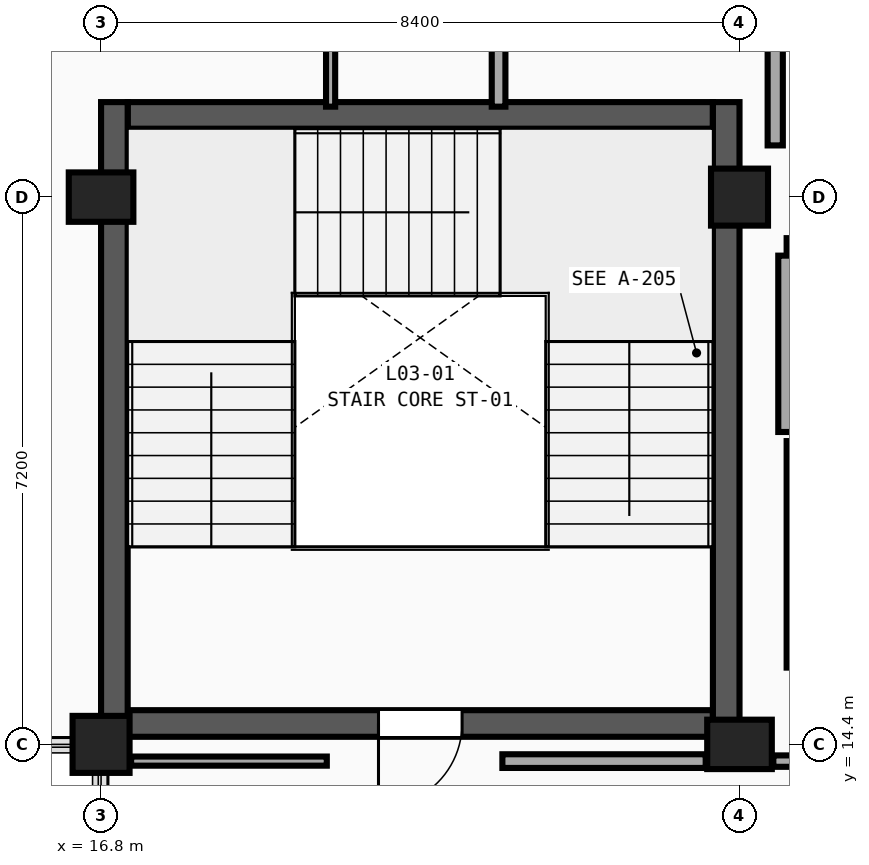
"""IFC4 building model, lengths in metres.
Left out: names, types, materials, properties, quantities, classifications, styles, units other than length and angle.
Written with IfcOpenShell. Run it as: python <this file> out.ifc"""

import sys

from ifc_helpers import new_model, si_unit, direction, frame, frame_2d, origin, origin_2d, place, context, subcontext, project, spatial, rectangle, extrude, element, fill, save


model = new_model("IFC4")
c1 = context("Model", 3, precision=1e-05, world=origin(), true_north=direction((0.0, 1.0)))
c2 = subcontext(c1, "Body", "Model", "MODEL_VIEW")
j1 = project(units=[si_unit("LENGTHUNIT", "METRE"), si_unit("PLANEANGLEUNIT", "RADIAN")], contexts=[c1])
p1 = place(None, origin())
s1 = spatial("IfcSite", under=j1, at=p1, CompositionType="ELEMENT")
p2 = place(p1, origin())
s2 = spatial("IfcBuilding", under=s1, at=p2, CompositionType="ELEMENT")
p3 = place(p2, frame((0.0, 0.0, 14.4)))
s3 = spatial("IfcBuildingStorey", under=s2, at=p3, CompositionType="ELEMENT", Elevation=14.4)
p4 = place(p3, frame((16.8, 14.4, 0.0), z_axis=(0.0, 0.0, 1.0), x_axis=(1.0, 0.0, 0.0)))
e1 = element("IfcColumn", 1, at=p4, inside=s3, PredefinedType="COLUMN", context=c2, shape_type="SweptSolid", body=[
    extrude(rectangle(XDim=0.75, YDim=0.75, at=origin_2d()), origin(), (0.0, 0.0, 1.0), 4.5),
])
for number, where, z_axis, x_axis in (
    (2, (16.8, 21.6, 0.0), (0.0, 0.0, 1.0), (1.0, 0.0, 0.0)),
    (3, (25.2, 14.4, 0.0), (0.0, 0.0, 1.0), (1.0, 0.0, 0.0)),
):
    element("IfcColumn", number, at=place(p3, frame(where, z_axis=z_axis, x_axis=x_axis)), inside=s3, PredefinedType="COLUMN", context=c2, shape_type="SweptSolid", body=[
        extrude(rectangle(XDim=0.85, YDim=0.65, at=origin_2d()), origin(), (0.0, 0.0, 1.0), 4.5),
    ])
p5 = place(p3, frame((25.2, 21.6, 0.0), z_axis=(0.0, 0.0, 1.0), x_axis=(1.0, 0.0, 0.0)))
e4 = element("IfcColumn", 4, at=p5, inside=s3, PredefinedType="COLUMN", context=c2, shape_type="SweptSolid", body=[
    extrude(rectangle(XDim=0.75, YDim=0.75, at=origin_2d()), origin(), (0.0, 0.0, 1.0), 4.5),
])
p6 = place(p3, frame((24.85, 14.675, 0.0), z_axis=(0.0, 0.0, 1.0), x_axis=(-1.0, 0.0, 0.0)))
e5 = element("IfcWall", 5, at=p6, inside=s3, PredefinedType="SHEAR", context=c2, shape_type="SweptSolid", body=[
    extrude(rectangle(XDim=7.7, YDim=0.35, at=frame_2d((3.85, 0.0))), origin(), (0.0, 0.0, 1.0), 4.5),
])
p7 = place(p6, frame((3.3, 0.0, 0.0)))
e6 = element("IfcOpeningElement", 6, at=p7, cuts=e5, PredefinedType="OPENING", context=c2, shape_type="SweptSolid", body=[
    extrude(rectangle(XDim=1.1, YDim=2.2, at=frame_2d((0.55, 1.1))), frame((0.0, 0.195, 0.0), z_axis=(0.0, -1.0, 0.0), x_axis=(1.0, 0.0, 0.0)), (0.0, 0.0, 1.0), 0.39),
])
p8 = place(p3, frame((17.15, 22.675, 0.0), z_axis=(0.0, 0.0, 1.0), x_axis=(1.0, 0.0, 0.0)))
e7 = element("IfcWall", 7, at=p8, inside=s3, PredefinedType="SHEAR", context=c2, shape_type="SweptSolid", body=[
    extrude(rectangle(XDim=7.7, YDim=0.35, at=frame_2d((3.85, 0.0))), origin(), (0.0, 0.0, 1.0), 4.5),
])
for number, where, z_axis, x_axis in (
    (8, (16.975, 22.85, 0.0), (0.0, 0.0, 1.0), (0.0, -1.0, 0.0)),
    (9, (25.025, 14.5, 0.0), (0.0, 0.0, 1.0), (0.0, 1.0, 0.0)),
):
    element("IfcWall", number, at=place(p3, frame(where, z_axis=z_axis, x_axis=x_axis)), inside=s3, PredefinedType="SHEAR", context=c2, shape_type="SweptSolid", body=[
        extrude(rectangle(XDim=8.35, YDim=0.35, at=frame_2d((4.175, 0.0))), origin(), (0.0, 0.0, 1.0), 4.5),
    ])
p9 = place(p3, frame((25.94, 18.39, 0.0), z_axis=(0.0, 0.0, 1.0), x_axis=(0.0, -1.0, 0.0)))
e10 = element("IfcWall", 10, at=p9, inside=s3, PredefinedType="SHEAR", context=c2, shape_type="SweptSolid", body=[
    extrude(rectangle(XDim=2.98, YDim=0.24, at=frame_2d((1.49, 0.0))), origin(), (0.0, 0.0, 1.0), 4.18),
])
p10 = place(p3, frame((25.82, 20.95, 0.0), z_axis=(0.0, 0.0, 1.0), x_axis=(1.0, 0.0, 0.0)))
e11 = element("IfcWall", 11, at=p10, inside=s3, PredefinedType="SOLIDWALL", context=c2, shape_type="SweptSolid", body=[
    extrude(rectangle(XDim=2.54, YDim=0.22, at=frame_2d((1.27, 0.0))), origin(), (0.0, 0.0, 1.0), 3.73),
])
p11 = place(p10, frame((0.745, 0.0, 0.0)))
e12 = element("IfcOpeningElement", 12, at=p11, cuts=e11, PredefinedType="OPENING", context=c2, shape_type="SweptSolid", body=[
    extrude(rectangle(XDim=1.05, YDim=2.15, at=frame_2d((0.525, 1.075))), frame((0.0, 0.13, 0.0), z_axis=(0.0, -1.0, 0.0), x_axis=(1.0, 0.0, 0.0)), (0.0, 0.0, 1.0), 0.26),
])
p12 = place(p3, frame((25.82, 18.51, 0.0), z_axis=(0.0, 0.0, 1.0), x_axis=(0.0, 1.0, 0.0)))
e13 = element("IfcWall", 13, at=p12, inside=s3, PredefinedType="SOLIDWALL", context=c2, shape_type="SweptSolid", body=[
    extrude(rectangle(XDim=2.32, YDim=0.22, at=frame_2d((1.16, 0.0))), origin(), (0.0, 0.0, 1.0), 4.18),
])
p13 = place(p3, frame((22.08, 14.18, 0.0), z_axis=(0.0, 0.0, 1.0), x_axis=(1.0, 0.0, 0.0)))
e14 = element("IfcWall", 14, at=p13, inside=s3, PredefinedType="PARTITIONING", context=c2, shape_type="SweptSolid", body=[
    extrude(rectangle(XDim=2.675, YDim=0.18, at=frame_2d((1.337, 0.0))), origin(), (0.0, 0.0, 1.0), 3.73),
])
p14 = place(p3, frame((25.645, 14.18, 0.0), z_axis=(0.0, 0.0, 1.0), x_axis=(1.0, 0.0, 0.0)))
e15 = element("IfcWall", 15, at=p14, inside=s3, PredefinedType="PARTITIONING", context=c2, shape_type="SweptSolid", body=[
    extrude(rectangle(XDim=7.56, YDim=0.15, at=frame_2d((3.78, 0.0))), origin(), (0.0, 0.0, 1.0), 3.73),
])
p15 = place(p3, frame((17.195, 14.18, 0.0), z_axis=(0.0, 0.0, 1.0), x_axis=(1.0, 0.0, 0.0)))
e16 = element("IfcWall", 16, at=p15, inside=s3, PredefinedType="PARTITIONING", context=c2, shape_type="SweptSolid", body=[
    extrude(rectangle(XDim=2.575, YDim=0.12, at=frame_2d((1.288, 0.0))), origin(), (0.0, 0.0, 1.0), 3.73),
])
p16 = place(p3, frame((22.03, 22.79, 0.0), z_axis=(0.0, 0.0, 1.0), x_axis=(0.0, 1.0, 0.0)))
e17 = element("IfcWall", 17, at=p16, inside=s3, PredefinedType="PARTITIONING", context=c2, shape_type="SweptSolid", body=[
    extrude(rectangle(XDim=2.23, YDim=0.18, at=frame_2d((1.115, 0.0))), origin(), (0.0, 0.0, 1.0), 4.18),
])
p17 = place(p3, frame((19.82, 22.79, 0.0), z_axis=(0.0, 0.0, 1.0), x_axis=(0.0, 1.0, 0.0)))
e18 = element("IfcWall", 18, at=p17, inside=s3, PredefinedType="PARTITIONING", context=c2, shape_type="SweptSolid", body=[
    extrude(rectangle(XDim=2.07, YDim=0.12, at=frame_2d((1.035, 0.0))), origin(), (0.0, 0.0, 1.0), 4.18),
])
p18 = place(p3, frame((25.67, 22.28, 0.0), z_axis=(0.0, 0.0, 1.0), x_axis=(0.0, 1.0, 0.0)))
e19 = element("IfcWall", 19, at=p18, inside=s3, PredefinedType="PLUMBINGWALL", context=c2, shape_type="SweptSolid", body=[
    extrude(rectangle(XDim=2.59, YDim=0.2, at=frame_2d((1.295, 0.0))), origin(), (0.0, 0.0, 1.0), 4.18),
])
p19 = place(p7, origin())
e20 = element("IfcDoor", 20, at=p19, inside=s3, OperationType="SINGLE_SWING_RIGHT", PredefinedType="DOOR", context=c2, shape_type="SweptSolid", body=[
    extrude(rectangle(XDim=1.1, YDim=2.2, at=frame_2d((0.55, 1.1))), frame((0.0, 0.025, 0.0), z_axis=(0.0, -1.0, 0.0), x_axis=(1.0, 0.0, 0.0)), (0.0, 0.0, 1.0), 0.05),
])
fill(e6, e20)
save(model, sys.argv[1])
